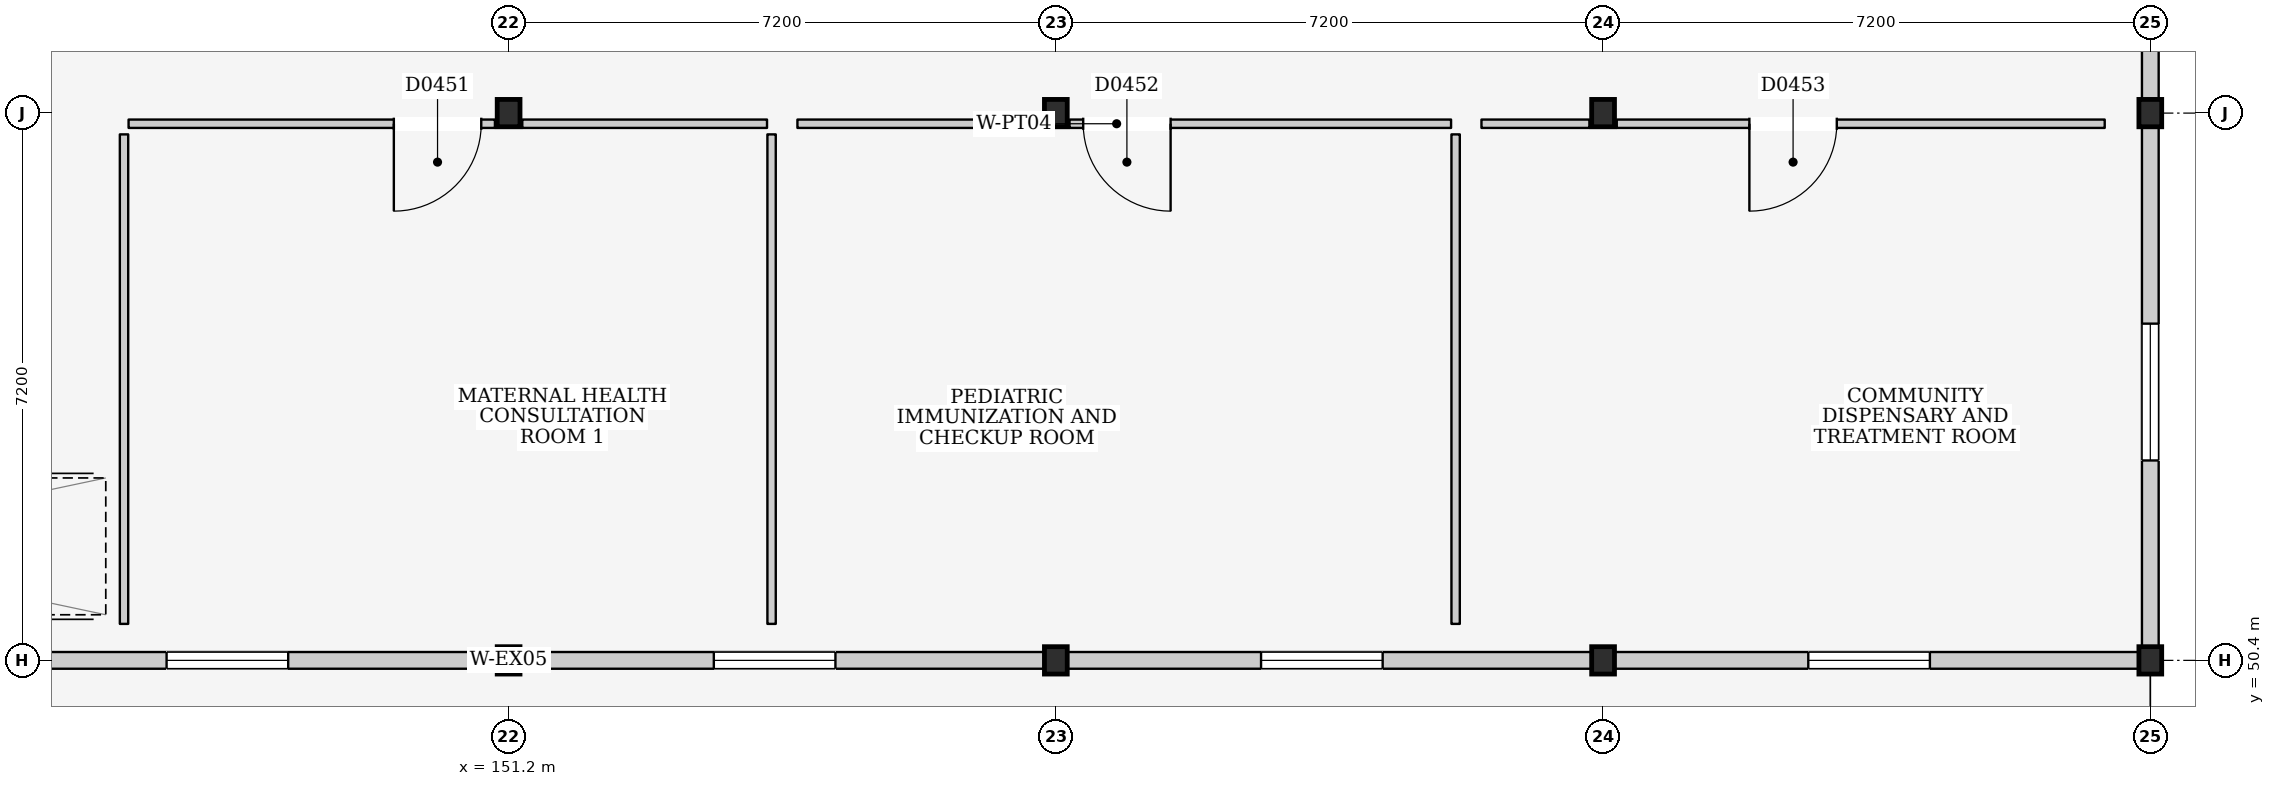
"""IFC4 building model, lengths in metres.
Left out: names, types, materials, properties, quantities, classifications, styles, units other than length and angle.
Written with IfcOpenShell. Run it as: python <this file> out.ifc"""

import sys

from ifc_helpers import new_model, si_unit, direction, frame, frame_2d, origin, origin_2d, place, context, subcontext, project, spatial, rectangle, i_section, extrude, element, fill, save


model = new_model("IFC4")
c1 = context("Model", 3, precision=1e-05, world=origin(), true_north=direction((0.0, 1.0)))
c2 = subcontext(c1, "Body", "Model", "MODEL_VIEW")
j1 = project(units=[si_unit("LENGTHUNIT", "METRE"), si_unit("PLANEANGLEUNIT", "RADIAN")], contexts=[c1])
p1 = place(None, origin())
s1 = spatial("IfcSite", under=j1, at=p1, CompositionType="ELEMENT")
p2 = place(p1, origin())
s2 = spatial("IfcBuilding", under=s1, at=p2, CompositionType="ELEMENT")
p3 = place(p2, frame((0.0, 0.0, 4.5)))
s3 = spatial("IfcBuildingStorey", under=s2, at=p3, CompositionType="ELEMENT", Elevation=4.5)
for number, where, z_axis, x_axis in (
    (1, (151.2, 50.4, 0.0), (0.0, 0.0, 1.0), (1.0, 0.0, 0.0)),
    (2, (151.2, 57.6, 0.0), (0.0, 0.0, 1.0), (1.0, 0.0, 0.0)),
    (3, (158.4, 50.4, 0.0), (0.0, 0.0, 1.0), (1.0, 0.0, 0.0)),
    (4, (158.4, 57.6, 0.0), (0.0, 0.0, 1.0), (1.0, 0.0, 0.0)),
    (5, (165.6, 50.4, 0.0), (0.0, 0.0, 1.0), (1.0, 0.0, 0.0)),
    (6, (165.6, 57.6, 0.0), (0.0, 0.0, 1.0), (1.0, 0.0, 0.0)),
    (7, (172.8, 50.4, 0.0), (0.0, 0.0, 1.0), (1.0, 0.0, 0.0)),
    (8, (172.8, 57.6, 0.0), (0.0, 0.0, 1.0), (1.0, 0.0, 0.0)),
):
    element("IfcColumn", number, at=place(p3, frame(where, z_axis=z_axis, x_axis=x_axis)), inside=s3, PredefinedType="COLUMN", context=c2, shape_type="SweptSolid", body=[
        extrude(i_section(OverallWidth=0.3, OverallDepth=0.36, WebThickness=0.012, FlangeThickness=0.022, at=origin_2d()), origin(), (0.0, 0.0, 1.0), 4.5),
    ])
p4 = place(p3, frame((144.15, 50.4, 0.0), z_axis=(0.0, 0.0, 1.0), x_axis=(1.0, 0.0, 0.0)))
e9 = element("IfcWall", 9, at=p4, inside=s3, PredefinedType="ELEMENTEDWALL", context=c2, shape_type="SweptSolid", body=[
    extrude(rectangle(XDim=6.9, YDim=0.22, at=frame_2d((3.45, 0.0))), origin(), (0.0, 0.0, 1.0), 3.9),
])
p5 = place(p4, frame((2.55, 0.0, 0.95)))
e10 = element("IfcOpeningElement", 10, at=p5, cuts=e9, PredefinedType="OPENING", context=c2, shape_type="SweptSolid", body=[
    extrude(rectangle(XDim=1.6, YDim=1.5, at=frame_2d((0.8, 0.75))), frame((0.0, 0.125, 0.0), z_axis=(0.0, -1.0, 0.0), x_axis=(1.0, 0.0, 0.0)), (0.0, 0.0, 1.0), 0.25),
])
p6 = place(p3, frame((151.35, 50.4, 0.0), z_axis=(0.0, 0.0, 1.0), x_axis=(1.0, 0.0, 0.0)))
e11 = element("IfcWall", 11, at=p6, inside=s3, PredefinedType="ELEMENTEDWALL", context=c2, shape_type="SweptSolid", body=[
    extrude(rectangle(XDim=6.9, YDim=0.22, at=frame_2d((3.45, 0.0))), origin(), (0.0, 0.0, 1.0), 3.9),
])
p7 = place(p6, frame((2.55, 0.0, 0.95)))
e12 = element("IfcOpeningElement", 12, at=p7, cuts=e11, PredefinedType="OPENING", context=c2, shape_type="SweptSolid", body=[
    extrude(rectangle(XDim=1.6, YDim=1.5, at=frame_2d((0.8, 0.75))), frame((0.0, 0.125, 0.0), z_axis=(0.0, -1.0, 0.0), x_axis=(1.0, 0.0, 0.0)), (0.0, 0.0, 1.0), 0.25),
])
p8 = place(p3, frame((158.55, 50.4, 0.0), z_axis=(0.0, 0.0, 1.0), x_axis=(1.0, 0.0, 0.0)))
e13 = element("IfcWall", 13, at=p8, inside=s3, PredefinedType="ELEMENTEDWALL", context=c2, shape_type="SweptSolid", body=[
    extrude(rectangle(XDim=6.9, YDim=0.22, at=frame_2d((3.45, 0.0))), origin(), (0.0, 0.0, 1.0), 3.9),
])
p9 = place(p8, frame((2.55, 0.0, 0.95)))
e14 = element("IfcOpeningElement", 14, at=p9, cuts=e13, PredefinedType="OPENING", context=c2, shape_type="SweptSolid", body=[
    extrude(rectangle(XDim=1.6, YDim=1.5, at=frame_2d((0.8, 0.75))), frame((0.0, 0.125, 0.0), z_axis=(0.0, -1.0, 0.0), x_axis=(1.0, 0.0, 0.0)), (0.0, 0.0, 1.0), 0.25),
])
p10 = place(p3, frame((165.75, 50.4, 0.0), z_axis=(0.0, 0.0, 1.0), x_axis=(1.0, 0.0, 0.0)))
e15 = element("IfcWall", 15, at=p10, inside=s3, PredefinedType="ELEMENTEDWALL", context=c2, shape_type="SweptSolid", body=[
    extrude(rectangle(XDim=6.9, YDim=0.22, at=frame_2d((3.45, 0.0))), origin(), (0.0, 0.0, 1.0), 3.9),
])
p11 = place(p10, frame((2.55, 0.0, 0.95)))
e16 = element("IfcOpeningElement", 16, at=p11, cuts=e15, PredefinedType="OPENING", context=c2, shape_type="SweptSolid", body=[
    extrude(rectangle(XDim=1.6, YDim=1.5, at=frame_2d((0.8, 0.75))), frame((0.0, 0.125, 0.0), z_axis=(0.0, -1.0, 0.0), x_axis=(1.0, 0.0, 0.0)), (0.0, 0.0, 1.0), 0.25),
])
p12 = place(p3, frame((172.8, 50.58, 0.0), z_axis=(0.0, 0.0, 1.0), x_axis=(0.0, 1.0, 0.0)))
e17 = element("IfcWall", 17, at=p12, inside=s3, PredefinedType="ELEMENTEDWALL", context=c2, shape_type="SweptSolid", body=[
    extrude(rectangle(XDim=6.84, YDim=0.22, at=frame_2d((3.42, 0.0))), origin(), (0.0, 0.0, 1.0), 3.9),
])
p13 = place(p12, frame((2.45, 0.0, 0.9)))
e18 = element("IfcOpeningElement", 18, at=p13, cuts=e17, PredefinedType="OPENING", context=c2, shape_type="SweptSolid", body=[
    extrude(rectangle(XDim=1.8, YDim=1.8, at=frame_2d((0.9, 0.9))), frame((0.0, 0.125, 0.0), z_axis=(0.0, -1.0, 0.0), x_axis=(1.0, 0.0, 0.0)), (0.0, 0.0, 1.0), 0.25),
])
p14 = place(p3, frame((172.8, 57.78, 0.0), z_axis=(0.0, 0.0, 1.0), x_axis=(0.0, 1.0, 0.0)))
e19 = element("IfcWall", 19, at=p14, inside=s3, PredefinedType="ELEMENTEDWALL", context=c2, shape_type="SweptSolid", body=[
    extrude(rectangle(XDim=6.84, YDim=0.22, at=frame_2d((3.42, 0.0))), origin(), (0.0, 0.0, 1.0), 3.9),
])
p15 = place(p14, frame((2.45, 0.0, 0.9)))
e20 = element("IfcOpeningElement", 20, at=p15, cuts=e19, PredefinedType="OPENING", context=c2, shape_type="SweptSolid", body=[
    extrude(rectangle(XDim=1.8, YDim=1.8, at=frame_2d((0.9, 0.9))), frame((0.0, 0.125, 0.0), z_axis=(0.0, -1.0, 0.0), x_axis=(1.0, 0.0, 0.0)), (0.0, 0.0, 1.0), 0.25),
])
p16 = place(p3, frame((146.2, 57.46, 0.0), z_axis=(0.0, 0.0, 1.0), x_axis=(1.0, 0.0, 0.0)))
e21 = element("IfcWall", 21, at=p16, inside=s3, PredefinedType="PARTITIONING", context=c2, shape_type="SweptSolid", body=[
    extrude(rectangle(XDim=4.82, YDim=0.11, at=frame_2d((2.41, 0.0))), origin(), (0.0, 0.0, 1.0), 4.25),
])
p17 = place(p16, frame((3.49, 0.0, 0.0)))
e22 = element("IfcOpeningElement", 22, at=p17, cuts=e21, PredefinedType="OPENING", context=c2, shape_type="SweptSolid", body=[
    extrude(rectangle(XDim=1.15, YDim=2.25, at=frame_2d((0.575, 1.125))), frame((0.0, 0.07, 0.0), z_axis=(0.0, -1.0, 0.0), x_axis=(1.0, 0.0, 0.0)), (0.0, 0.0, 1.0), 0.14),
])
p18 = place(p3, frame((151.38, 57.46, 0.0), z_axis=(0.0, 0.0, 1.0), x_axis=(1.0, 0.0, 0.0)))
e23 = element("IfcWall", 23, at=p18, inside=s3, PredefinedType="PARTITIONING", context=c2, shape_type="SweptSolid", body=[
    extrude(rectangle(XDim=3.22, YDim=0.11, at=frame_2d((1.61, 0.0))), origin(), (0.0, 0.0, 1.0), 4.25),
])
for number, where, z_axis, x_axis in (
    (24, (146.14, 50.88, 0.0), (0.0, 0.0, 1.0), (0.0, 1.0, 0.0)),
    (25, (154.66, 50.88, 0.0), (0.0, 0.0, 1.0), (0.0, 1.0, 0.0)),
):
    element("IfcWall", number, at=place(p3, frame(where, z_axis=z_axis, x_axis=x_axis)), inside=s3, PredefinedType="PARTITIONING", context=c2, shape_type="SweptSolid", body=[
        extrude(rectangle(XDim=6.44, YDim=0.11, at=frame_2d((3.22, 0.0))), origin(), (0.0, 0.0, 1.0), 4.25),
    ])
p19 = place(p3, frame((155.0, 57.46, 0.0), z_axis=(0.0, 0.0, 1.0), x_axis=(1.0, 0.0, 0.0)))
e26 = element("IfcWall", 26, at=p19, inside=s3, PredefinedType="PARTITIONING", context=c2, shape_type="SweptSolid", body=[
    extrude(rectangle(XDim=3.22, YDim=0.11, at=frame_2d((1.61, 0.0))), origin(), (0.0, 0.0, 1.0), 4.25),
])
p20 = place(p3, frame((158.58, 57.46, 0.0), z_axis=(0.0, 0.0, 1.0), x_axis=(1.0, 0.0, 0.0)))
e27 = element("IfcWall", 27, at=p20, inside=s3, PredefinedType="PARTITIONING", context=c2, shape_type="SweptSolid", body=[
    extrude(rectangle(XDim=5.02, YDim=0.11, at=frame_2d((2.51, 0.0))), origin(), (0.0, 0.0, 1.0), 4.25),
])
p21 = place(p20, frame((0.18, 0.0, 0.0)))
e28 = element("IfcOpeningElement", 28, at=p21, cuts=e27, PredefinedType="OPENING", context=c2, shape_type="SweptSolid", body=[
    extrude(rectangle(XDim=1.15, YDim=2.25, at=frame_2d((0.575, 1.125))), frame((0.0, 0.07, 0.0), z_axis=(0.0, -1.0, 0.0), x_axis=(1.0, 0.0, 0.0)), (0.0, 0.0, 1.0), 0.14),
])
p22 = place(p3, frame((163.66, 50.88, 0.0), z_axis=(0.0, 0.0, 1.0), x_axis=(0.0, 1.0, 0.0)))
e29 = element("IfcWall", 29, at=p22, inside=s3, PredefinedType="PARTITIONING", context=c2, shape_type="SweptSolid", body=[
    extrude(rectangle(XDim=6.44, YDim=0.11, at=frame_2d((3.22, 0.0))), origin(), (0.0, 0.0, 1.0), 4.25),
])
p23 = place(p3, frame((164.0, 57.46, 0.0), z_axis=(0.0, 0.0, 1.0), x_axis=(1.0, 0.0, 0.0)))
e30 = element("IfcWall", 30, at=p23, inside=s3, PredefinedType="PARTITIONING", context=c2, shape_type="SweptSolid", body=[
    extrude(rectangle(XDim=1.42, YDim=0.11, at=frame_2d((0.71, 0.0))), origin(), (0.0, 0.0, 1.0), 4.25),
])
p24 = place(p3, frame((165.78, 57.46, 0.0), z_axis=(0.0, 0.0, 1.0), x_axis=(1.0, 0.0, 0.0)))
e31 = element("IfcWall", 31, at=p24, inside=s3, PredefinedType="PARTITIONING", context=c2, shape_type="SweptSolid", body=[
    extrude(rectangle(XDim=6.42, YDim=0.11, at=frame_2d((3.21, 0.0))), origin(), (0.0, 0.0, 1.0), 4.25),
])
p25 = place(p24, frame((1.745, 0.0, 0.0)))
e32 = element("IfcOpeningElement", 32, at=p25, cuts=e31, PredefinedType="OPENING", context=c2, shape_type="SweptSolid", body=[
    extrude(rectangle(XDim=1.15, YDim=2.25, at=frame_2d((0.575, 1.125))), frame((0.0, 0.07, 0.0), z_axis=(0.0, -1.0, 0.0), x_axis=(1.0, 0.0, 0.0)), (0.0, 0.0, 1.0), 0.14),
])
p26 = place(p5, origin())
e33 = element("IfcWindow", 33, at=p26, inside=s3, PartitioningType="DOUBLE_PANEL_VERTICAL", PredefinedType="WINDOW", context=c2, shape_type="SweptSolid", body=[
    extrude(rectangle(XDim=1.6, YDim=1.5, at=frame_2d((0.8, 0.75))), frame((0.0, 0.03, 0.0), z_axis=(0.0, -1.0, 0.0), x_axis=(1.0, 0.0, 0.0)), (0.0, 0.0, 1.0), 0.06),
])
fill(e10, e33)
p27 = place(p7, origin())
e34 = element("IfcWindow", 34, at=p27, inside=s3, PartitioningType="DOUBLE_PANEL_VERTICAL", PredefinedType="WINDOW", context=c2, shape_type="SweptSolid", body=[
    extrude(rectangle(XDim=1.6, YDim=1.5, at=frame_2d((0.8, 0.75))), frame((0.0, 0.03, 0.0), z_axis=(0.0, -1.0, 0.0), x_axis=(1.0, 0.0, 0.0)), (0.0, 0.0, 1.0), 0.06),
])
fill(e12, e34)
p28 = place(p9, origin())
e35 = element("IfcWindow", 35, at=p28, inside=s3, PartitioningType="DOUBLE_PANEL_VERTICAL", PredefinedType="WINDOW", context=c2, shape_type="SweptSolid", body=[
    extrude(rectangle(XDim=1.6, YDim=1.5, at=frame_2d((0.8, 0.75))), frame((0.0, 0.03, 0.0), z_axis=(0.0, -1.0, 0.0), x_axis=(1.0, 0.0, 0.0)), (0.0, 0.0, 1.0), 0.06),
])
fill(e14, e35)
p29 = place(p11, origin())
e36 = element("IfcWindow", 36, at=p29, inside=s3, PartitioningType="DOUBLE_PANEL_VERTICAL", PredefinedType="WINDOW", context=c2, shape_type="SweptSolid", body=[
    extrude(rectangle(XDim=1.6, YDim=1.5, at=frame_2d((0.8, 0.75))), frame((0.0, 0.03, 0.0), z_axis=(0.0, -1.0, 0.0), x_axis=(1.0, 0.0, 0.0)), (0.0, 0.0, 1.0), 0.06),
])
fill(e16, e36)
p30 = place(p13, origin())
e37 = element("IfcWindow", 37, at=p30, inside=s3, PartitioningType="DOUBLE_PANEL_VERTICAL", PredefinedType="WINDOW", context=c2, shape_type="SweptSolid", body=[
    extrude(rectangle(XDim=1.8, YDim=1.8, at=frame_2d((0.9, 0.9))), frame((0.0, 0.03, 0.0), z_axis=(0.0, -1.0, 0.0), x_axis=(1.0, 0.0, 0.0)), (0.0, 0.0, 1.0), 0.06),
])
fill(e18, e37)
p31 = place(p17, frame((1.15, 0.0, 0.0), z_axis=(0.0, 0.0, 1.0), x_axis=(-1.0, 0.0, 0.0)))
e38 = element("IfcDoor", 38, at=p31, inside=s3, OperationType="SINGLE_SWING_RIGHT", PredefinedType="DOOR", context=c2, shape_type="SweptSolid", body=[
    extrude(rectangle(XDim=1.15, YDim=2.25, at=frame_2d((0.575, 1.125))), frame((0.0, 0.025, 0.0), z_axis=(0.0, -1.0, 0.0), x_axis=(1.0, 0.0, 0.0)), (0.0, 0.0, 1.0), 0.05),
])
fill(e22, e38)
p32 = place(p21, frame((1.15, 0.0, 0.0), z_axis=(0.0, 0.0, 1.0), x_axis=(-1.0, 0.0, 0.0)))
e39 = element("IfcDoor", 39, at=p32, inside=s3, OperationType="SINGLE_SWING_LEFT", PredefinedType="DOOR", context=c2, shape_type="SweptSolid", body=[
    extrude(rectangle(XDim=1.15, YDim=2.25, at=frame_2d((0.575, 1.125))), frame((0.0, 0.025, 0.0), z_axis=(0.0, -1.0, 0.0), x_axis=(1.0, 0.0, 0.0)), (0.0, 0.0, 1.0), 0.05),
])
fill(e28, e39)
p33 = place(p25, frame((1.15, 0.0, 0.0), z_axis=(0.0, 0.0, 1.0), x_axis=(-1.0, 0.0, 0.0)))
e40 = element("IfcDoor", 40, at=p33, inside=s3, OperationType="SINGLE_SWING_RIGHT", PredefinedType="DOOR", context=c2, shape_type="SweptSolid", body=[
    extrude(rectangle(XDim=1.15, YDim=2.25, at=frame_2d((0.575, 1.125))), frame((0.0, 0.025, 0.0), z_axis=(0.0, -1.0, 0.0), x_axis=(1.0, 0.0, 0.0)), (0.0, 0.0, 1.0), 0.05),
])
fill(e32, e40)
save(model, sys.argv[1])
